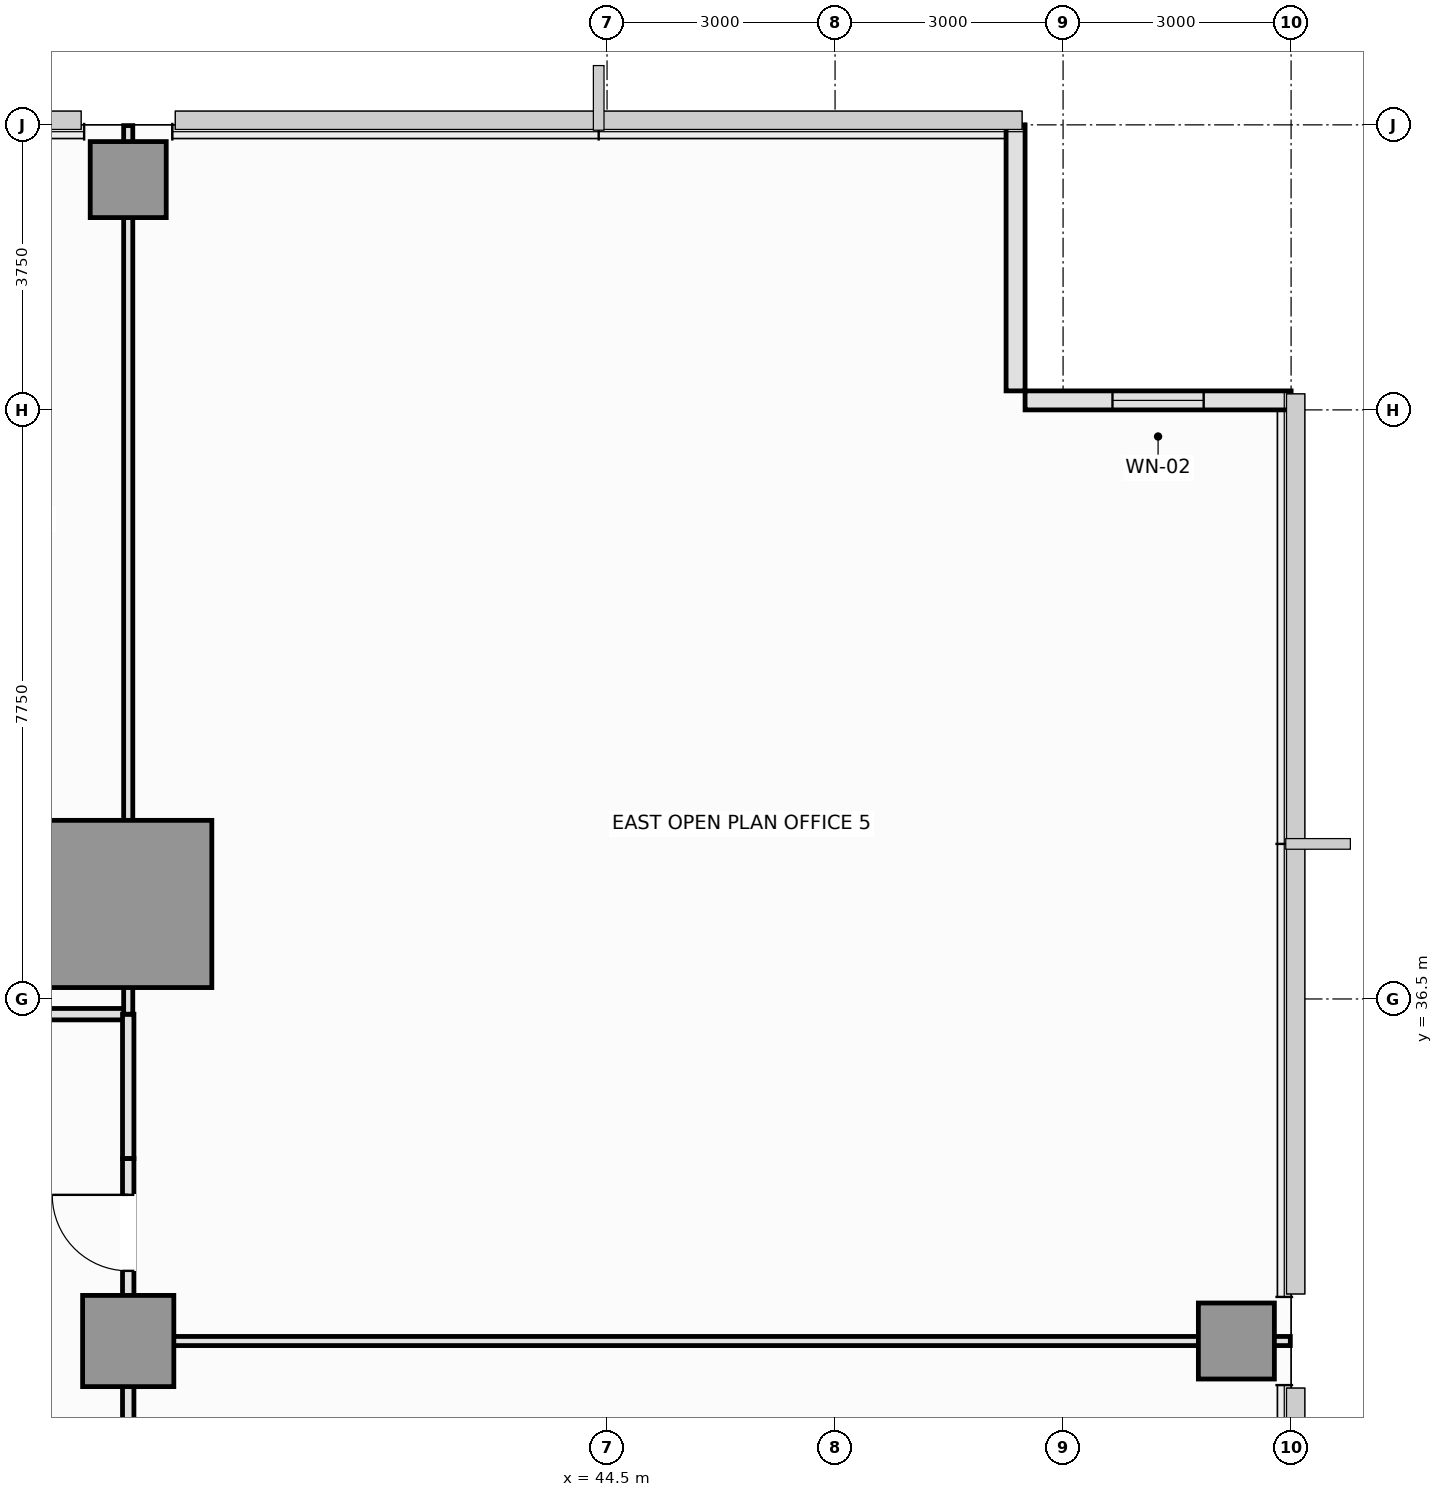
"""IFC4 building model, lengths in metres.
Left out: names, types, materials, properties, quantities, classifications, styles, units other than length and angle.
Written with IfcOpenShell. Run it as: python <this file> out.ifc"""

import sys

from ifc_helpers import new_model, si_unit, direction, frame, frame_2d, origin, origin_2d, place, context, subcontext, project, spatial, rectangle, extrude, element, fill, save


model = new_model("IFC4")
c1 = context("Model", 3, precision=1e-05, world=origin(), true_north=direction((0.0, 1.0)))
c2 = subcontext(c1, "Body", "Model", "MODEL_VIEW")
j1 = project(units=[si_unit("LENGTHUNIT", "METRE"), si_unit("PLANEANGLEUNIT", "RADIAN")], contexts=[c1])
p1 = place(None, origin())
s1 = spatial("IfcSite", under=j1, at=p1, CompositionType="ELEMENT")
p2 = place(p1, origin())
s2 = spatial("IfcBuilding", under=s1, at=p2, CompositionType="ELEMENT")
p3 = place(p2, frame((0.0, 0.0, 78.85)))
s3 = spatial("IfcBuildingStorey", under=s2, at=p3, CompositionType="ELEMENT", Elevation=78.85)
p4 = place(p3, frame((38.2, 37.75, 0.0), z_axis=(0.0, 0.0, 1.0), x_axis=(1.0, 0.0, 0.0)))
e1 = element("IfcColumn", 1, at=p4, inside=s3, PredefinedType="COLUMN", context=c2, shape_type="SweptSolid", body=[
    extrude(rectangle(XDim=2.2, YDim=2.2, at=origin_2d()), origin(), (0.0, 0.0, 1.0), 3.55),
])
p5 = place(p3, frame((38.2, 32.0, 0.0), z_axis=(0.0, 0.0, 1.0), x_axis=(1.0, 0.0, 0.0)))
e2 = element("IfcColumn", 2, at=p5, inside=s3, PredefinedType="COLUMN", context=c2, shape_type="SweptSolid", body=[
    extrude(rectangle(XDim=1.2, YDim=1.2, at=origin_2d()), origin(), (0.0, 0.0, 1.0), 3.55),
])
for number, where, z_axis, x_axis in (
    (3, (52.78, 32.0, 0.0), (0.0, 0.0, 1.0), (1.0, 0.0, 0.0)),
    (4, (38.2, 47.28, 0.0), (0.0, 0.0, 1.0), (1.0, 0.0, 0.0)),
):
    element("IfcColumn", number, at=place(p3, frame(where, z_axis=z_axis, x_axis=x_axis)), inside=s3, PredefinedType="COLUMN", context=c2, shape_type="SweptSolid", body=[
        extrude(rectangle(XDim=1.0, YDim=1.0, at=origin_2d()), origin(), (0.0, 0.0, 1.0), 3.55),
    ])
p6 = place(p3, frame((53.5, 44.375, 0.0), z_axis=(0.0, 0.0, 1.0), x_axis=(-1.0, 0.0, 0.0)))
e5 = element("IfcWall", 5, at=p6, inside=s3, PredefinedType="SOLIDWALL", context=c2, shape_type="SweptSolid", body=[
    extrude(rectangle(XDim=3.5, YDim=0.25, at=frame_2d((1.75, 0.0))), origin(), (0.0, 0.0, 1.0), 3.37),
])
p7 = place(p6, frame((1.15, 0.0, 0.9)))
e6 = element("IfcOpeningElement", 6, at=p7, cuts=e5, PredefinedType="OPENING", context=c2, shape_type="SweptSolid", body=[
    extrude(rectangle(XDim=1.2, YDim=1.8, at=frame_2d((0.6, 0.9))), frame((0.0, 0.135, 0.0), z_axis=(0.0, -1.0, 0.0), x_axis=(1.0, 0.0, 0.0)), (0.0, 0.0, 1.0), 0.27),
])
p8 = place(p3, frame((49.875, 44.5, 0.0), z_axis=(0.0, 0.0, 1.0), x_axis=(0.0, 1.0, 0.0)))
e7 = element("IfcWall", 7, at=p8, inside=s3, PredefinedType="SOLIDWALL", context=c2, shape_type="SweptSolid", body=[
    extrude(rectangle(XDim=3.5, YDim=0.25, at=frame_2d((1.75, 0.0))), origin(), (0.0, 0.0, 1.0), 3.37),
])
p9 = place(p3, frame((34.6, 36.3, 0.0), z_axis=(0.0, 0.0, 1.0), x_axis=(1.0, 0.0, 0.0)))
e8 = element("IfcWall", 8, at=p9, inside=s3, PredefinedType="PARTITIONING", context=c2, shape_type="SweptSolid", body=[
    extrude(rectangle(XDim=3.6, YDim=0.15, at=frame_2d((1.8, 0.0))), origin(), (0.0, 0.0, 1.0), 3.37),
])
p10 = place(p9, frame((1.225, 0.0, 0.0)))
e9 = element("IfcOpeningElement", 9, at=p10, cuts=e8, PredefinedType="OPENING", context=c2, shape_type="SweptSolid", body=[
    extrude(rectangle(XDim=1.0, YDim=2.15, at=frame_2d((0.5, 1.075))), frame((0.0, 0.085, 0.0), z_axis=(0.0, -1.0, 0.0), x_axis=(1.0, 0.0, 0.0)), (0.0, 0.0, 1.0), 0.17),
])
p11 = place(p3, frame((38.2, 34.4, 0.0), z_axis=(0.0, 0.0, 1.0), x_axis=(0.0, 1.0, 0.0)))
e10 = element("IfcWall", 10, at=p11, inside=s3, PredefinedType="PARTITIONING", context=c2, shape_type="SweptSolid", body=[
    extrude(rectangle(XDim=1.9, YDim=0.15, at=frame_2d((0.95, 0.0))), origin(), (0.0, 0.0, 1.0), 2.82),
])
p12 = place(p3, frame((38.2, 27.5, 0.0), z_axis=(0.0, 0.0, 1.0), x_axis=(0.0, 1.0, 0.0)))
e11 = element("IfcWall", 11, at=p12, inside=s3, PredefinedType="PARTITIONING", context=c2, shape_type="SweptSolid", body=[
    extrude(rectangle(XDim=4.5, YDim=0.15, at=frame_2d((2.25, 0.0))), origin(), (0.0, 0.0, 1.0), 2.82),
])
p13 = place(p12, frame((1.75, 0.0, 0.0)))
e12 = element("IfcOpeningElement", 12, at=p13, cuts=e11, PredefinedType="OPENING", context=c2, shape_type="SweptSolid", body=[
    extrude(rectangle(XDim=1.0, YDim=2.15, at=frame_2d((0.5, 1.075))), frame((0.0, 0.085, 0.0), z_axis=(0.0, -1.0, 0.0), x_axis=(1.0, 0.0, 0.0)), (0.0, 0.0, 1.0), 0.17),
])
p14 = place(p3, frame((38.2, 32.0, 0.0), z_axis=(0.0, 0.0, 1.0), x_axis=(0.0, 1.0, 0.0)))
e13 = element("IfcWall", 13, at=p14, inside=s3, PredefinedType="PARTITIONING", context=c2, shape_type="SweptSolid", body=[
    extrude(rectangle(XDim=2.4, YDim=0.15, at=frame_2d((1.2, 0.0))), origin(), (0.0, 0.0, 1.0), 2.82),
])
p15 = place(p14, frame((0.923, 0.0, 0.0)))
e14 = element("IfcOpeningElement", 14, at=p15, cuts=e13, PredefinedType="OPENING", context=c2, shape_type="SweptSolid", body=[
    extrude(rectangle(XDim=1.0, YDim=2.15, at=frame_2d((0.5, 1.075))), frame((0.0, 0.085, 0.0), z_axis=(0.0, -1.0, 0.0), x_axis=(1.0, 0.0, 0.0)), (0.0, 0.0, 1.0), 0.17),
])
p16 = place(p3, frame((38.2, 36.3, 0.0), z_axis=(0.0, 0.0, 1.0), x_axis=(0.0, 1.0, 0.0)))
e15 = element("IfcWall", 15, at=p16, inside=s3, PredefinedType="PARTITIONING", context=c2, shape_type="SweptSolid", body=[
    extrude(rectangle(XDim=11.69, YDim=0.12, at=frame_2d((5.845, 0.0))), origin(), (0.0, 0.0, 1.0), 2.82),
])
p17 = place(p3, frame((38.2, 32.0, 0.0), z_axis=(0.0, 0.0, 1.0), x_axis=(1.0, 0.0, 0.0)))
e16 = element("IfcWall", 16, at=p17, inside=s3, PredefinedType="PARTITIONING", context=c2, shape_type="SweptSolid", body=[
    extrude(rectangle(XDim=15.29, YDim=0.12, at=frame_2d((7.645, 0.0))), origin(), (0.0, 0.0, 1.0), 2.72),
])
p18 = place(p7, origin())
e17 = element("IfcWindow", 17, at=p18, inside=s3, PartitioningType="SINGLE_PANEL", PredefinedType="WINDOW", context=c2, shape_type="SweptSolid", body=[
    extrude(rectangle(XDim=1.2, YDim=1.8, at=frame_2d((0.6, 0.9))), frame((0.0, 0.03, 0.0), z_axis=(0.0, -1.0, 0.0), x_axis=(1.0, 0.0, 0.0)), (0.0, 0.0, 1.0), 0.06),
])
fill(e6, e17)
p19 = place(p15, origin())
e18 = element("IfcDoor", 18, at=p19, inside=s3, OperationType="SINGLE_SWING_RIGHT", PredefinedType="DOOR", context=c2, shape_type="SweptSolid", body=[
    extrude(rectangle(XDim=1.0, YDim=2.15, at=frame_2d((0.5, 1.075))), frame((0.0, 0.025, 0.0), z_axis=(0.0, -1.0, 0.0), x_axis=(1.0, 0.0, 0.0)), (0.0, 0.0, 1.0), 0.05),
])
fill(e14, e18)
save(model, sys.argv[1])
